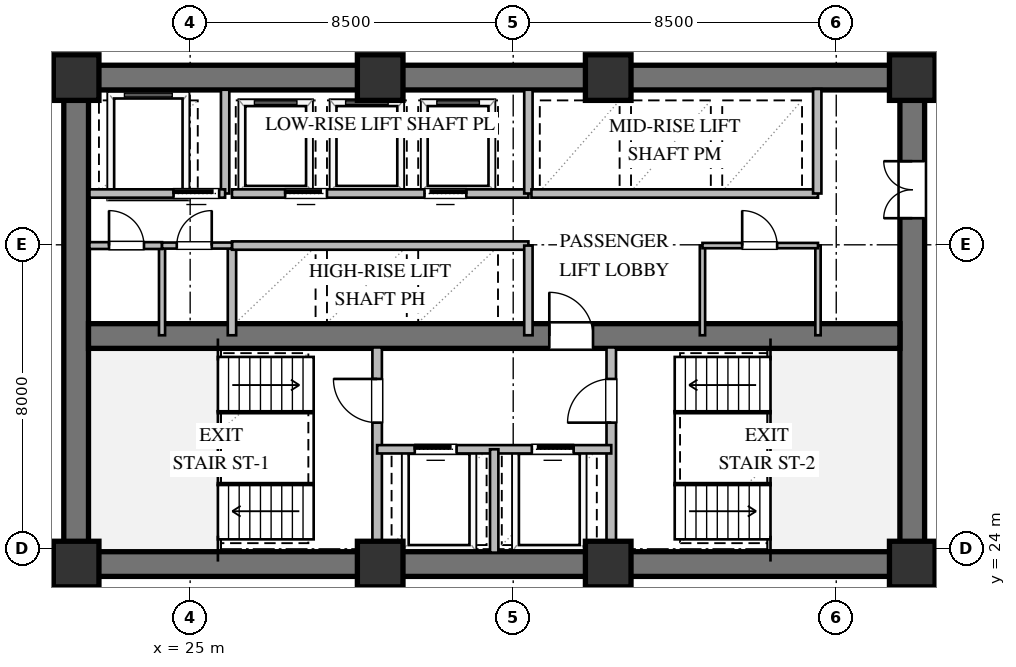
"""IFC4 building model, lengths in metres.
Left out: names, types, materials, properties, quantities, classifications, styles, units other than length and angle.
Written with IfcOpenShell. Run it as: python <this file> out.ifc"""

import sys

from ifc_helpers import new_model, si_unit, direction, frame, frame_2d, origin, origin_2d, place, context, subcontext, project, spatial, rectangle, extrude, element, fill, save


model = new_model("IFC4")
c1 = context("Model", 3, precision=1e-05, world=origin(), true_north=direction((0.0, 1.0)))
c2 = subcontext(c1, "Body", "Model", "MODEL_VIEW")
j1 = project(units=[si_unit("LENGTHUNIT", "METRE"), si_unit("PLANEANGLEUNIT", "RADIAN")], contexts=[c1])
p1 = place(None, origin())
s1 = spatial("IfcSite", under=j1, at=p1, CompositionType="ELEMENT")
p2 = place(p1, origin())
s2 = spatial("IfcBuilding", under=s1, at=p2, CompositionType="ELEMENT")
p3 = place(p2, frame((0.0, 0.0, 78.0)))
s3 = spatial("IfcBuildingStorey", under=s2, at=p3, CompositionType="ELEMENT", Elevation=78.0)
for number, where, z_axis, x_axis in (
    (1, (21.675, 23.6, 0.0), (0.0, 0.0, 1.0), (1.0, 0.0, 0.0)),
    (2, (21.675, 36.4, 0.0), (0.0, 0.0, 1.0), (1.0, 0.0, 0.0)),
):
    element("IfcWall", number, at=place(p3, frame(where, z_axis=z_axis, x_axis=x_axis)), inside=s3, PredefinedType="SHEAR", context=c2, shape_type="SweptSolid", body=[
        extrude(rectangle(XDim=22.65, YDim=0.65, at=frame_2d((11.325, 0.0))), origin(), (0.0, 0.0, 1.0), 3.36),
    ])
p4 = place(p3, frame((22.0, 23.925, 0.0), z_axis=(0.0, 0.0, 1.0), x_axis=(0.0, 1.0, 0.0)))
e3 = element("IfcWall", 3, at=p4, inside=s3, PredefinedType="SHEAR", context=c2, shape_type="SweptSolid", body=[
    extrude(rectangle(XDim=12.15, YDim=0.65, at=frame_2d((6.075, 0.0))), origin(), (0.0, 0.0, 1.0), 3.36),
])
p5 = place(p3, frame((44.0, 23.925, 0.0), z_axis=(0.0, 0.0, 1.0), x_axis=(0.0, 1.0, 0.0)))
e4 = element("IfcWall", 4, at=p5, inside=s3, PredefinedType="SHEAR", context=c2, shape_type="SweptSolid", body=[
    extrude(rectangle(XDim=12.15, YDim=0.65, at=frame_2d((6.075, 0.0))), origin(), (0.0, 0.0, 1.0), 3.36),
])
p6 = place(p5, frame((8.775, 0.0, 0.0)))
e5 = element("IfcOpeningElement", 5, at=p6, cuts=e4, PredefinedType="OPENING", context=c2, shape_type="SweptSolid", body=[
    extrude(rectangle(XDim=1.5, YDim=2.15, at=frame_2d((0.75, 1.075))), frame((0.0, 0.335, 0.0), z_axis=(0.0, -1.0, 0.0), x_axis=(1.0, 0.0, 0.0)), (0.0, 0.0, 1.0), 0.67),
])
p7 = place(p3, frame((22.325, 29.6, 0.0), z_axis=(0.0, 0.0, 1.0), x_axis=(1.0, 0.0, 0.0)))
e6 = element("IfcWall", 6, at=p7, inside=s3, PredefinedType="SHEAR", context=c2, shape_type="SweptSolid", body=[
    extrude(rectangle(XDim=21.35, YDim=0.65, at=frame_2d((10.675, 0.0))), origin(), (0.0, 0.0, 1.0), 3.36),
])
p8 = place(p7, frame((12.125, 0.0, 0.0)))
e7 = element("IfcOpeningElement", 7, at=p8, cuts=e6, PredefinedType="OPENING", context=c2, shape_type="SweptSolid", body=[
    extrude(rectangle(XDim=1.15, YDim=2.1, at=frame_2d((0.575, 1.05))), frame((0.0, 0.335, 0.0), z_axis=(0.0, -1.0, 0.0), x_axis=(1.0, 0.0, 0.0)), (0.0, 0.0, 1.0), 0.67),
])
for number, where, z_axis, x_axis in (
    (8, (22.0, 23.6, 0.0), (0.0, 0.0, 1.0), (1.0, 0.0, 0.0)),
    (9, (30.0, 23.6, 0.0), (0.0, 0.0, 1.0), (1.0, 0.0, 0.0)),
    (10, (36.0, 23.6, 0.0), (0.0, 0.0, 1.0), (1.0, 0.0, 0.0)),
    (11, (44.0, 23.6, 0.0), (0.0, 0.0, 1.0), (1.0, 0.0, 0.0)),
    (12, (44.0, 36.4, 0.0), (0.0, 0.0, 1.0), (1.0, 0.0, 0.0)),
    (13, (36.0, 36.4, 0.0), (0.0, 0.0, 1.0), (1.0, 0.0, 0.0)),
    (14, (30.0, 36.4, 0.0), (0.0, 0.0, 1.0), (1.0, 0.0, 0.0)),
    (15, (22.0, 36.4, 0.0), (0.0, 0.0, 1.0), (1.0, 0.0, 0.0)),
):
    element("IfcColumn", number, at=place(p3, frame(where, z_axis=z_axis, x_axis=x_axis)), inside=s3, PredefinedType="COLUMN", context=c2, shape_type="SweptSolid", body=[
        extrude(rectangle(XDim=1.2, YDim=1.2, at=origin_2d()), origin(), (0.0, 0.0, 1.0), 3.6),
    ])
p9 = place(p3, frame((29.92, 23.9, 0.0), z_axis=(0.0, 0.0, 1.0), x_axis=(0.0, 1.0, 0.0)))
e16 = element("IfcWall", 16, at=p9, inside=s3, PredefinedType="SOLIDWALL", context=c2, shape_type="SweptSolid", body=[
    extrude(rectangle(XDim=5.4, YDim=0.25, at=frame_2d((2.7, 0.0))), origin(), (0.0, 0.0, 1.0), 3.36),
])
p10 = place(p9, frame((3.421, 0.0, 0.0)))
e17 = element("IfcOpeningElement", 17, at=p10, cuts=e16, PredefinedType="OPENING", context=c2, shape_type="SweptSolid", body=[
    extrude(rectangle(XDim=1.15, YDim=2.1, at=frame_2d((0.575, 1.05))), frame((0.0, 0.135, 0.0), z_axis=(0.0, -1.0, 0.0), x_axis=(1.0, 0.0, 0.0)), (0.0, 0.0, 1.0), 0.27),
])
p11 = place(p3, frame((36.08, 23.9, 0.0), z_axis=(0.0, 0.0, 1.0), x_axis=(0.0, 1.0, 0.0)))
e18 = element("IfcWall", 18, at=p11, inside=s3, PredefinedType="SOLIDWALL", context=c2, shape_type="SweptSolid", body=[
    extrude(rectangle(XDim=5.4, YDim=0.25, at=frame_2d((2.7, 0.0))), origin(), (0.0, 0.0, 1.0), 3.36),
])
p12 = place(p11, frame((3.421, 0.0, 0.0)))
e19 = element("IfcOpeningElement", 19, at=p12, cuts=e18, PredefinedType="OPENING", context=c2, shape_type="SweptSolid", body=[
    extrude(rectangle(XDim=1.15, YDim=2.1, at=frame_2d((0.575, 1.05))), frame((0.0, 0.135, 0.0), z_axis=(0.0, -1.0, 0.0), x_axis=(1.0, 0.0, 0.0)), (0.0, 0.0, 1.0), 0.27),
])
p13 = place(p3, frame((29.92, 26.62, 0.0), z_axis=(0.0, 0.0, 1.0), x_axis=(1.0, 0.0, 0.0)))
e20 = element("IfcWall", 20, at=p13, inside=s3, PredefinedType="SOLIDWALL", context=c2, shape_type="SweptSolid", body=[
    extrude(rectangle(XDim=6.16, YDim=0.22, at=frame_2d((3.08, 0.0))), origin(), (0.0, 0.0, 1.0), 3.36),
])
p14 = place(p13, frame((0.99, 0.0, 0.0)))
e21 = element("IfcOpeningElement", 21, at=p14, cuts=e20, PredefinedType="OPENING", context=c2, shape_type="SweptSolid", body=[
    extrude(rectangle(XDim=1.1, YDim=2.1, at=frame_2d((0.55, 1.05))), frame((0.0, 0.12, 0.0), z_axis=(0.0, -1.0, 0.0), x_axis=(1.0, 0.0, 0.0)), (0.0, 0.0, 1.0), 0.24),
])
p15 = place(p13, frame((4.07, 0.0, 0.0)))
e22 = element("IfcOpeningElement", 22, at=p15, cuts=e20, PredefinedType="OPENING", context=c2, shape_type="SweptSolid", body=[
    extrude(rectangle(XDim=1.1, YDim=2.1, at=frame_2d((0.55, 1.05))), frame((0.0, 0.12, 0.0), z_axis=(0.0, -1.0, 0.0), x_axis=(1.0, 0.0, 0.0)), (0.0, 0.0, 1.0), 0.24),
])
p16 = place(p3, frame((33.0, 23.9, 0.0), z_axis=(0.0, 0.0, 1.0), x_axis=(0.0, 1.0, 0.0)))
e23 = element("IfcWall", 23, at=p16, inside=s3, PredefinedType="SOLIDWALL", context=c2, shape_type="SweptSolid", body=[
    extrude(rectangle(XDim=2.72, YDim=0.22, at=frame_2d((1.36, 0.0))), origin(), (0.0, 0.0, 1.0), 3.36),
])
p17 = place(p3, frame((25.92, 33.35, 0.0), z_axis=(0.0, 0.0, 1.0), x_axis=(0.0, 1.0, 0.0)))
e24 = element("IfcWall", 24, at=p17, inside=s3, PredefinedType="SOLIDWALL", context=c2, shape_type="SweptSolid", body=[
    extrude(rectangle(XDim=2.73, YDim=0.22, at=frame_2d((1.365, 0.0))), origin(), (0.0, 0.0, 1.0), 3.36),
])
p18 = place(p3, frame((22.35, 33.35, 0.0), z_axis=(0.0, 0.0, 1.0), x_axis=(1.0, 0.0, 0.0)))
e25 = element("IfcWall", 25, at=p18, inside=s3, PredefinedType="SOLIDWALL", context=c2, shape_type="SweptSolid", body=[
    extrude(rectangle(XDim=3.57, YDim=0.22, at=frame_2d((1.785, 0.0))), origin(), (0.0, 0.0, 1.0), 3.36),
])
p19 = place(p18, frame((2.213, 0.0, 0.0)))
e26 = element("IfcOpeningElement", 26, at=p19, cuts=e25, PredefinedType="OPENING", context=c2, shape_type="SweptSolid", body=[
    extrude(rectangle(XDim=1.2, YDim=2.1, at=frame_2d((0.6, 1.05))), frame((0.0, 0.12, 0.0), z_axis=(0.0, -1.0, 0.0), x_axis=(1.0, 0.0, 0.0)), (0.0, 0.0, 1.0), 0.24),
])
p20 = place(p3, frame((26.1, 29.62, 0.0), z_axis=(0.0, 0.0, 1.0), x_axis=(0.0, 1.0, 0.0)))
e27 = element("IfcWall", 27, at=p20, inside=s3, PredefinedType="SOLIDWALL", context=c2, shape_type="SweptSolid", body=[
    extrude(rectangle(XDim=2.36, YDim=0.22, at=frame_2d((1.18, 0.0))), origin(), (0.0, 0.0, 1.0), 3.36),
])
p21 = place(p3, frame((26.1, 31.98, 0.0), z_axis=(0.0, 0.0, 1.0), x_axis=(1.0, 0.0, 0.0)))
e28 = element("IfcWall", 28, at=p21, inside=s3, PredefinedType="SOLIDWALL", context=c2, shape_type="SweptSolid", body=[
    extrude(rectangle(XDim=7.8, YDim=0.22, at=frame_2d((3.9, 0.0))), origin(), (0.0, 0.0, 1.0), 3.36),
])
p22 = place(p3, frame((33.9, 29.62, 0.0), z_axis=(0.0, 0.0, 1.0), x_axis=(0.0, 1.0, 0.0)))
e29 = element("IfcWall", 29, at=p22, inside=s3, PredefinedType="SOLIDWALL", context=c2, shape_type="SweptSolid", body=[
    extrude(rectangle(XDim=2.36, YDim=0.22, at=frame_2d((1.18, 0.0))), origin(), (0.0, 0.0, 1.0), 3.36),
])
p23 = place(p3, frame((26.1, 33.35, 0.0), z_axis=(0.0, 0.0, 1.0), x_axis=(1.0, 0.0, 0.0)))
e30 = element("IfcWall", 30, at=p23, inside=s3, PredefinedType="SOLIDWALL", context=c2, shape_type="SweptSolid", body=[
    extrude(rectangle(XDim=7.8, YDim=0.22, at=frame_2d((3.9, 0.0))), origin(), (0.0, 0.0, 1.0), 3.36),
])
p24 = place(p23, frame((1.4, 0.0, 0.0)))
e31 = element("IfcOpeningElement", 31, at=p24, cuts=e30, PredefinedType="OPENING", context=c2, shape_type="SweptSolid", body=[
    extrude(rectangle(XDim=1.1, YDim=2.1, at=frame_2d((0.55, 1.05))), frame((0.0, 0.12, 0.0), z_axis=(0.0, -1.0, 0.0), x_axis=(1.0, 0.0, 0.0)), (0.0, 0.0, 1.0), 0.24),
])
p25 = place(p23, frame((5.066, 0.0, 0.0)))
e32 = element("IfcOpeningElement", 32, at=p25, cuts=e30, PredefinedType="OPENING", context=c2, shape_type="SweptSolid", body=[
    extrude(rectangle(XDim=1.1, YDim=2.1, at=frame_2d((0.55, 1.05))), frame((0.0, 0.12, 0.0), z_axis=(0.0, -1.0, 0.0), x_axis=(1.0, 0.0, 0.0)), (0.0, 0.0, 1.0), 0.24),
])
p26 = place(p3, frame((33.9, 33.35, 0.0), z_axis=(0.0, 0.0, 1.0), x_axis=(0.0, 1.0, 0.0)))
e33 = element("IfcWall", 33, at=p26, inside=s3, PredefinedType="SOLIDWALL", context=c2, shape_type="SweptSolid", body=[
    extrude(rectangle(XDim=2.73, YDim=0.22, at=frame_2d((1.365, 0.0))), origin(), (0.0, 0.0, 1.0), 3.36),
])
p27 = place(p3, frame((33.98, 33.35, 0.0), z_axis=(0.0, 0.0, 1.0), x_axis=(1.0, 0.0, 0.0)))
e34 = element("IfcWall", 34, at=p27, inside=s3, PredefinedType="SOLIDWALL", context=c2, shape_type="SweptSolid", body=[
    extrude(rectangle(XDim=7.54, YDim=0.22, at=frame_2d((3.77, 0.0))), origin(), (0.0, 0.0, 1.0), 3.36),
])
p28 = place(p3, frame((41.5, 33.35, 0.0), z_axis=(0.0, 0.0, 1.0), x_axis=(0.0, 1.0, 0.0)))
e35 = element("IfcWall", 35, at=p28, inside=s3, PredefinedType="SOLIDWALL", context=c2, shape_type="SweptSolid", body=[
    extrude(rectangle(XDim=2.75, YDim=0.22, at=frame_2d((1.375, 0.0))), origin(), (0.0, 0.0, 1.0), 3.36),
])
p29 = place(p3, frame((24.26, 29.62, 0.0), z_axis=(0.0, 0.0, 1.0), x_axis=(0.0, 1.0, 0.0)))
e36 = element("IfcWall", 36, at=p29, inside=s3, PredefinedType="PLUMBINGWALL", context=c2, shape_type="SweptSolid", body=[
    extrude(rectangle(XDim=2.36, YDim=0.16, at=frame_2d((1.18, 0.0))), origin(), (0.0, 0.0, 1.0), 3.36),
])
p30 = place(p3, frame((22.35, 31.98, 0.0), z_axis=(0.0, 0.0, 1.0), x_axis=(1.0, 0.0, 0.0)))
e37 = element("IfcWall", 37, at=p30, inside=s3, PredefinedType="PARTITIONING", context=c2, shape_type="SweptSolid", body=[
    extrude(rectangle(XDim=1.91, YDim=0.18, at=frame_2d((0.955, 0.0))), origin(), (0.0, 0.0, 1.0), 3.36),
])
p31 = place(p30, frame((0.515, 0.0, 0.0)))
e38 = element("IfcOpeningElement", 38, at=p31, cuts=e37, PredefinedType="OPENING", context=c2, shape_type="SweptSolid", body=[
    extrude(rectangle(XDim=0.92, YDim=2.1, at=frame_2d((0.46, 1.05))), frame((0.0, 0.1, 0.0), z_axis=(0.0, -1.0, 0.0), x_axis=(1.0, 0.0, 0.0)), (0.0, 0.0, 1.0), 0.2),
])
p32 = place(p3, frame((24.26, 31.98, 0.0), z_axis=(0.0, 0.0, 1.0), x_axis=(1.0, 0.0, 0.0)))
e39 = element("IfcWall", 39, at=p32, inside=s3, PredefinedType="PLUMBINGWALL", context=c2, shape_type="SweptSolid", body=[
    extrude(rectangle(XDim=1.84, YDim=0.16, at=frame_2d((0.92, 0.0))), origin(), (0.0, 0.0, 1.0), 3.36),
])
p33 = place(p32, frame((0.388, 0.0, 0.0)))
e40 = element("IfcOpeningElement", 40, at=p33, cuts=e39, PredefinedType="OPENING", context=c2, shape_type="SweptSolid", body=[
    extrude(rectangle(XDim=0.92, YDim=2.1, at=frame_2d((0.46, 1.05))), frame((0.0, 0.09, 0.0), z_axis=(0.0, -1.0, 0.0), x_axis=(1.0, 0.0, 0.0)), (0.0, 0.0, 1.0), 0.18),
])
for number, where, z_axis, x_axis in (
    (41, (38.48, 29.62, 0.0), (0.0, 0.0, 1.0), (0.0, 1.0, 0.0)),
    (42, (41.52, 29.62, 0.0), (0.0, 0.0, 1.0), (0.0, 1.0, 0.0)),
):
    element("IfcWall", number, at=place(p3, frame(where, z_axis=z_axis, x_axis=x_axis)), inside=s3, PredefinedType="PARTITIONING", context=c2, shape_type="SweptSolid", body=[
        extrude(rectangle(XDim=2.36, YDim=0.14, at=frame_2d((1.18, 0.0))), origin(), (0.0, 0.0, 1.0), 3.36),
    ])
p34 = place(p3, frame((38.48, 31.98, 0.0), z_axis=(0.0, 0.0, 1.0), x_axis=(1.0, 0.0, 0.0)))
e43 = element("IfcWall", 43, at=p34, inside=s3, PredefinedType="PARTITIONING", context=c2, shape_type="SweptSolid", body=[
    extrude(rectangle(XDim=3.04, YDim=0.14, at=frame_2d((1.52, 0.0))), origin(), (0.0, 0.0, 1.0), 3.36),
])
p35 = place(p34, frame((1.045, 0.0, 0.0)))
e44 = element("IfcOpeningElement", 44, at=p35, cuts=e43, PredefinedType="OPENING", context=c2, shape_type="SweptSolid", body=[
    extrude(rectangle(XDim=0.92, YDim=2.1, at=frame_2d((0.46, 1.05))), frame((0.0, 0.08, 0.0), z_axis=(0.0, -1.0, 0.0), x_axis=(1.0, 0.0, 0.0)), (0.0, 0.0, 1.0), 0.16),
])
p36 = place(p10, origin())
e45 = element("IfcDoor", 45, at=p36, inside=s3, OperationType="SINGLE_SWING_RIGHT", PredefinedType="DOOR", context=c2, shape_type="SweptSolid", body=[
    extrude(rectangle(XDim=1.15, YDim=2.1, at=frame_2d((0.575, 1.05))), frame((0.0, 0.025, 0.0), z_axis=(0.0, -1.0, 0.0), x_axis=(1.0, 0.0, 0.0)), (0.0, 0.0, 1.0), 0.05),
])
fill(e17, e45)
p37 = place(p12, origin())
e46 = element("IfcDoor", 46, at=p37, inside=s3, OperationType="SINGLE_SWING_LEFT", PredefinedType="DOOR", context=c2, shape_type="SweptSolid", body=[
    extrude(rectangle(XDim=1.15, YDim=2.1, at=frame_2d((0.575, 1.05))), frame((0.0, 0.025, 0.0), z_axis=(0.0, -1.0, 0.0), x_axis=(1.0, 0.0, 0.0)), (0.0, 0.0, 1.0), 0.05),
])
fill(e19, e46)
p38 = place(p14, origin())
e47 = element("IfcDoor", 47, at=p38, inside=s3, OperationType="SLIDING_TO_LEFT", PredefinedType="DOOR", context=c2, shape_type="SweptSolid", body=[
    extrude(rectangle(XDim=1.1, YDim=2.1, at=frame_2d((0.55, 1.05))), frame((0.0, 0.025, 0.0), z_axis=(0.0, -1.0, 0.0), x_axis=(1.0, 0.0, 0.0)), (0.0, 0.0, 1.0), 0.05),
])
fill(e21, e47)
p39 = place(p15, origin())
e48 = element("IfcDoor", 48, at=p39, inside=s3, OperationType="SLIDING_TO_RIGHT", PredefinedType="DOOR", context=c2, shape_type="SweptSolid", body=[
    extrude(rectangle(XDim=1.1, YDim=2.1, at=frame_2d((0.55, 1.05))), frame((0.0, 0.025, 0.0), z_axis=(0.0, -1.0, 0.0), x_axis=(1.0, 0.0, 0.0)), (0.0, 0.0, 1.0), 0.05),
])
fill(e22, e48)
p40 = place(p8, origin())
e49 = element("IfcDoor", 49, at=p40, inside=s3, OperationType="SINGLE_SWING_LEFT", PredefinedType="DOOR", context=c2, shape_type="SweptSolid", body=[
    extrude(rectangle(XDim=1.15, YDim=2.1, at=frame_2d((0.575, 1.05))), frame((0.0, 0.025, 0.0), z_axis=(0.0, -1.0, 0.0), x_axis=(1.0, 0.0, 0.0)), (0.0, 0.0, 1.0), 0.05),
])
fill(e7, e49)
p41 = place(p6, origin())
e50 = element("IfcDoor", 50, at=p41, inside=s3, OperationType="DOUBLE_DOOR_SINGLE_SWING", PredefinedType="DOOR", context=c2, shape_type="SweptSolid", body=[
    extrude(rectangle(XDim=1.5, YDim=2.15, at=frame_2d((0.75, 1.075))), frame((0.0, 0.025, 0.0), z_axis=(0.0, -1.0, 0.0), x_axis=(1.0, 0.0, 0.0)), (0.0, 0.0, 1.0), 0.05),
])
fill(e5, e50)
p42 = place(p19, origin())
e51 = element("IfcDoor", 51, at=p42, inside=s3, OperationType="SLIDING_TO_LEFT", PredefinedType="DOOR", context=c2, shape_type="SweptSolid", body=[
    extrude(rectangle(XDim=1.2, YDim=2.1, at=frame_2d((0.6, 1.05))), frame((0.0, 0.025, 0.0), z_axis=(0.0, -1.0, 0.0), x_axis=(1.0, 0.0, 0.0)), (0.0, 0.0, 1.0), 0.05),
])
fill(e26, e51)
p43 = place(p24, origin())
e52 = element("IfcDoor", 52, at=p43, inside=s3, OperationType="SLIDING_TO_LEFT", PredefinedType="DOOR", context=c2, shape_type="SweptSolid", body=[
    extrude(rectangle(XDim=1.1, YDim=2.1, at=frame_2d((0.55, 1.05))), frame((0.0, 0.025, 0.0), z_axis=(0.0, -1.0, 0.0), x_axis=(1.0, 0.0, 0.0)), (0.0, 0.0, 1.0), 0.05),
])
fill(e31, e52)
p44 = place(p25, origin())
e53 = element("IfcDoor", 53, at=p44, inside=s3, OperationType="SLIDING_TO_RIGHT", PredefinedType="DOOR", context=c2, shape_type="SweptSolid", body=[
    extrude(rectangle(XDim=1.1, YDim=2.1, at=frame_2d((0.55, 1.05))), frame((0.0, 0.025, 0.0), z_axis=(0.0, -1.0, 0.0), x_axis=(1.0, 0.0, 0.0)), (0.0, 0.0, 1.0), 0.05),
])
fill(e32, e53)
p45 = place(p31, origin())
e54 = element("IfcDoor", 54, at=p45, inside=s3, OperationType="SINGLE_SWING_LEFT", PredefinedType="DOOR", context=c2, shape_type="SweptSolid", body=[
    extrude(rectangle(XDim=0.92, YDim=2.1, at=frame_2d((0.46, 1.05))), frame((0.0, 0.025, 0.0), z_axis=(0.0, -1.0, 0.0), x_axis=(1.0, 0.0, 0.0)), (0.0, 0.0, 1.0), 0.05),
])
fill(e38, e54)
p46 = place(p33, origin())
e55 = element("IfcDoor", 55, at=p46, inside=s3, OperationType="SINGLE_SWING_RIGHT", PredefinedType="DOOR", context=c2, shape_type="SweptSolid", body=[
    extrude(rectangle(XDim=0.92, YDim=2.1, at=frame_2d((0.46, 1.05))), frame((0.0, 0.025, 0.0), z_axis=(0.0, -1.0, 0.0), x_axis=(1.0, 0.0, 0.0)), (0.0, 0.0, 1.0), 0.05),
])
fill(e40, e55)
p47 = place(p35, origin())
e56 = element("IfcDoor", 56, at=p47, inside=s3, OperationType="SINGLE_SWING_LEFT", PredefinedType="DOOR", context=c2, shape_type="SweptSolid", body=[
    extrude(rectangle(XDim=0.92, YDim=2.1, at=frame_2d((0.46, 1.05))), frame((0.0, 0.025, 0.0), z_axis=(0.0, -1.0, 0.0), x_axis=(1.0, 0.0, 0.0)), (0.0, 0.0, 1.0), 0.05),
])
fill(e44, e56)
save(model, sys.argv[1])
